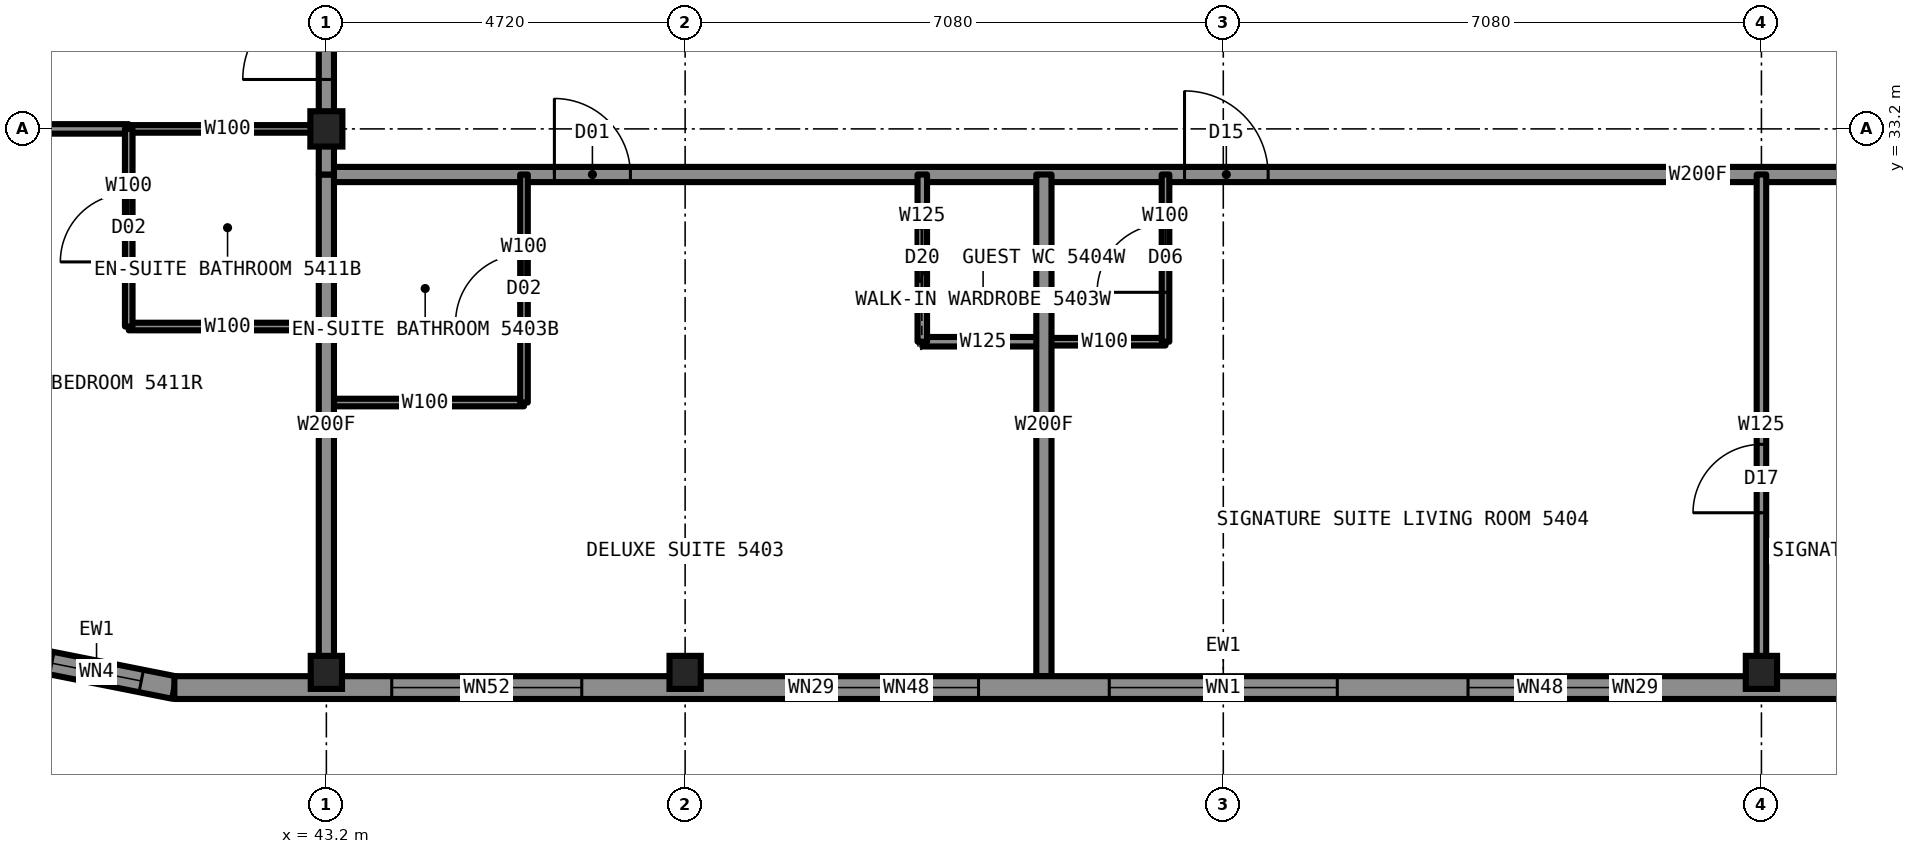
"""IFC4 building model, lengths in metres.
Left out: names, types, materials, properties, quantities, classifications, styles, units other than length and angle.
Written with IfcOpenShell. Run it as: python <this file> out.ifc"""

import sys

from ifc_helpers import new_model, si_unit, direction, frame, frame_2d, origin, origin_2d, place, context, subcontext, project, spatial, rectangle, i_section, extrude, element, fill, save


model = new_model("IFC4")
c1 = context("Model", 3, precision=1e-05, world=origin(), true_north=direction((0.0, 1.0)))
c2 = subcontext(c1, "Body", "Model", "MODEL_VIEW")
j1 = project(units=[si_unit("LENGTHUNIT", "METRE"), si_unit("PLANEANGLEUNIT", "RADIAN")], contexts=[c1])
p1 = place(None, origin())
s1 = spatial("IfcSite", under=j1, at=p1, CompositionType="ELEMENT")
p2 = place(p1, origin())
s2 = spatial("IfcBuilding", under=s1, at=p2, CompositionType="ELEMENT")
p3 = place(p2, frame((0.0, 0.0, 193.3)))
s3 = spatial("IfcBuildingStorey", under=s2, at=p3, CompositionType="ELEMENT", Elevation=193.3)
for number, where, z_axis, x_axis in (
    (1, (43.2, 26.05, 0.0), (0.0, 0.0, 1.0), (1.0, 0.0, 0.0)),
    (2, (47.92, 26.05, 0.0), (0.0, 0.0, 1.0), (1.0, 0.0, 0.0)),
    (3, (62.08, 26.05, 0.0), (0.0, 0.0, 1.0), (1.0, 0.0, 0.0)),
):
    element("IfcColumn", number, at=place(p3, frame(where, z_axis=z_axis, x_axis=x_axis)), inside=s3, PredefinedType="COLUMN", context=c2, shape_type="SweptSolid", body=[
        extrude(i_section(OverallWidth=0.411, OverallDepth=0.434, WebThickness=0.036, FlangeThickness=0.057, at=origin_2d()), origin(), (0.0, 0.0, 1.0), 3.5),
    ])
p4 = place(p3, frame((43.2, 33.2, 0.0), z_axis=(0.0, 0.0, 1.0), x_axis=(1.0, 0.0, 0.0)))
e4 = element("IfcColumn", 4, at=p4, inside=s3, PredefinedType="COLUMN", context=c2, shape_type="SweptSolid", body=[
    extrude(i_section(OverallWidth=0.422, OverallDepth=0.465, WebThickness=0.045, FlangeThickness=0.073, at=origin_2d()), origin(), (0.0, 0.0, 1.0), 3.5),
])
p5 = place(p3, frame((40.6, 33.2, 0.0), z_axis=(0.0, 0.0, 1.0), x_axis=(1.0, 0.0, 0.0)))
e5 = element("IfcWall", 5, at=p5, inside=s3, PredefinedType="PARTITIONING", context=c2, shape_type="SweptSolid", body=[
    extrude(rectangle(XDim=2.6, YDim=0.1, at=frame_2d((1.3, 0.0))), origin(), (0.0, 0.0, 1.0), 2.573),
])
p6 = place(p3, frame((36.0, 33.2, 0.0), z_axis=(0.0, 0.0, 1.0), x_axis=(1.0, 0.0, 0.0)))
e6 = element("IfcWall", 6, at=p6, inside=s3, PredefinedType="PARTITIONING", context=c2, shape_type="SweptSolid", body=[
    extrude(rectangle(XDim=4.6, YDim=0.125, at=frame_2d((2.3, 0.0))), origin(), (0.0, 0.0, 1.0), 2.573),
])
p7 = place(p6, frame((2.55, 0.0, 0.0)))
e7 = element("IfcOpeningElement", 7, at=p7, cuts=e6, PredefinedType="OPENING", context=c2, shape_type="SweptSolid", body=[
    extrude(rectangle(XDim=0.9, YDim=2.2, at=frame_2d((0.45, 1.1))), frame((0.0, 0.073, 0.0), z_axis=(0.0, -1.0, 0.0), x_axis=(1.0, 0.0, 0.0)), (0.0, 0.0, 1.0), 0.145),
])
p8 = place(p3, frame((43.2, 32.6, 0.0), z_axis=(0.0, 0.0, 1.0), x_axis=(1.0, 0.0, 0.0)))
e8 = element("IfcWall", 8, at=p8, inside=s3, PredefinedType="PARTITIONING", context=c2, shape_type="SweptSolid", body=[
    extrude(rectangle(XDim=23.6, YDim=0.2, at=frame_2d((11.8, 0.0))), origin(), (0.0, 0.0, 1.0), 3.33),
])
p9 = place(p8, frame((3.0, 0.0, 0.0)))
e9 = element("IfcOpeningElement", 9, at=p9, cuts=e8, PredefinedType="OPENING", context=c2, shape_type="SweptSolid", body=[
    extrude(rectangle(XDim=1.0, YDim=2.2, at=frame_2d((0.5, 1.1))), frame((0.0, 0.11, 0.0), z_axis=(0.0, -1.0, 0.0), x_axis=(1.0, 0.0, 0.0)), (0.0, 0.0, 1.0), 0.22),
])
p10 = place(p8, frame((11.29, 0.0, 0.0)))
e10 = element("IfcOpeningElement", 10, at=p10, cuts=e8, PredefinedType="OPENING", context=c2, shape_type="SweptSolid", body=[
    extrude(rectangle(XDim=1.1, YDim=2.2, at=frame_2d((0.55, 1.1))), frame((0.0, 0.11, 0.0), z_axis=(0.0, -1.0, 0.0), x_axis=(1.0, 0.0, 0.0)), (0.0, 0.0, 1.0), 0.22),
])
p11 = place(p3, frame((40.6, 30.6, 0.0), z_axis=(0.0, 0.0, 1.0), x_axis=(1.0, 0.0, 0.0)))
e11 = element("IfcWall", 11, at=p11, inside=s3, PredefinedType="PARTITIONING", context=c2, shape_type="SweptSolid", body=[
    extrude(rectangle(XDim=2.6, YDim=0.1, at=frame_2d((1.3, 0.0))), origin(), (0.0, 0.0, 1.0), 3.33),
])
p12 = place(p3, frame((52.64, 30.4, 0.0), z_axis=(0.0, 0.0, 1.0), x_axis=(1.0, 0.0, 0.0)))
e12 = element("IfcWall", 12, at=p12, inside=s3, PredefinedType="PARTITIONING", context=c2, shape_type="SweptSolid", body=[
    extrude(rectangle(XDim=1.6, YDim=0.1, at=frame_2d((0.8, 0.0))), origin(), (0.0, 0.0, 1.0), 3.33),
])
p13 = place(p3, frame((51.04, 30.4, 0.0), z_axis=(0.0, 0.0, 1.0), x_axis=(1.0, 0.0, 0.0)))
e13 = element("IfcWall", 13, at=p13, inside=s3, PredefinedType="PARTITIONING", context=c2, shape_type="SweptSolid", body=[
    extrude(rectangle(XDim=1.6, YDim=0.125, at=frame_2d((0.8, 0.0))), origin(), (0.0, 0.0, 1.0), 3.33),
])
p14 = place(p3, frame((43.2, 29.6, 0.0), z_axis=(0.0, 0.0, 1.0), x_axis=(1.0, 0.0, 0.0)))
e14 = element("IfcWall", 14, at=p14, inside=s3, PredefinedType="PARTITIONING", context=c2, shape_type="SweptSolid", body=[
    extrude(rectangle(XDim=2.6, YDim=0.1, at=frame_2d((1.3, 0.0))), origin(), (0.0, 0.0, 1.0), 3.33),
])
p15 = place(p3, frame((54.24, 30.4, 0.0), z_axis=(0.0, 0.0, 1.0), x_axis=(0.0, 1.0, 0.0)))
e15 = element("IfcWall", 15, at=p15, inside=s3, PredefinedType="PARTITIONING", context=c2, shape_type="SweptSolid", body=[
    extrude(rectangle(XDim=2.2, YDim=0.1, at=frame_2d((1.1, 0.0))), origin(), (0.0, 0.0, 1.0), 3.33),
])
p16 = place(p15, frame((0.65, 0.0, 0.0)))
e16 = element("IfcOpeningElement", 16, at=p16, cuts=e15, PredefinedType="OPENING", context=c2, shape_type="SweptSolid", body=[
    extrude(rectangle(XDim=0.9, YDim=2.1, at=frame_2d((0.45, 1.05))), frame((0.0, 0.06, 0.0), z_axis=(0.0, -1.0, 0.0), x_axis=(1.0, 0.0, 0.0)), (0.0, 0.0, 1.0), 0.12),
])
p17 = place(p3, frame((43.2, 33.22, 0.0), z_axis=(0.0, 0.0, 1.0), x_axis=(0.0, 1.0, 0.0)))
e17 = element("IfcWall", 17, at=p17, inside=s3, PredefinedType="PARTITIONING", context=c2, shape_type="SweptSolid", body=[
    extrude(rectangle(XDim=23.56, YDim=0.2, at=frame_2d((11.78, 0.0))), origin(), (0.0, 0.0, 1.0), 3.33),
])
p18 = place(p17, frame((7.25, 0.0, 0.0)))
e18 = element("IfcOpeningElement", 18, at=p18, cuts=e17, PredefinedType="OPENING", context=c2, shape_type="SweptSolid", body=[
    extrude(rectangle(XDim=1.0, YDim=2.2, at=frame_2d((0.5, 1.1))), frame((0.0, 0.11, 0.0), z_axis=(0.0, -1.0, 0.0), x_axis=(1.0, 0.0, 0.0)), (0.0, 0.0, 1.0), 0.22),
])
p19 = place(p17, frame((12.42, 0.0, 0.0)))
e19 = element("IfcOpeningElement", 19, at=p19, cuts=e17, PredefinedType="OPENING", context=c2, shape_type="SweptSolid", body=[
    extrude(rectangle(XDim=1.0, YDim=2.2, at=frame_2d((0.5, 1.1))), frame((0.0, 0.11, 0.0), z_axis=(0.0, -1.0, 0.0), x_axis=(1.0, 0.0, 0.0)), (0.0, 0.0, 1.0), 0.22),
])
p20 = place(p17, frame((22.03, 0.0, 0.0)))
e20 = element("IfcOpeningElement", 20, at=p20, cuts=e17, PredefinedType="OPENING", context=c2, shape_type="SweptSolid", body=[
    extrude(rectangle(XDim=1.1, YDim=2.2, at=frame_2d((0.55, 1.1))), frame((0.0, 0.11, 0.0), z_axis=(0.0, -1.0, 0.0), x_axis=(1.0, 0.0, 0.0)), (0.0, 0.0, 1.0), 0.22),
])
p21 = place(p17, frame((0.63, 0.0, 0.0)))
e21 = element("IfcOpeningElement", 21, at=p21, cuts=e17, PredefinedType="OPENING", context=c2, shape_type="SweptSolid", body=[
    extrude(rectangle(XDim=1.1, YDim=2.2, at=frame_2d((0.55, 1.1))), frame((0.0, 0.11, 0.0), z_axis=(0.0, -1.0, 0.0), x_axis=(1.0, 0.0, 0.0)), (0.0, 0.0, 1.0), 0.22),
])
p22 = place(p3, frame((43.2, 26.0, 0.0), z_axis=(0.0, 0.0, 1.0), x_axis=(0.0, 1.0, 0.0)))
e22 = element("IfcWall", 22, at=p22, inside=s3, PredefinedType="PARTITIONING", context=c2, shape_type="SweptSolid", body=[
    extrude(rectangle(XDim=6.6, YDim=0.2, at=frame_2d((3.3, 0.0))), origin(), (0.0, 0.0, 1.0), 2.573),
])
p23 = place(p3, frame((40.6, 30.6, 0.0), z_axis=(0.0, 0.0, 1.0), x_axis=(0.0, 1.0, 0.0)))
e23 = element("IfcWall", 23, at=p23, inside=s3, PredefinedType="PARTITIONING", context=c2, shape_type="SweptSolid", body=[
    extrude(rectangle(XDim=2.6, YDim=0.1, at=frame_2d((1.3, 0.0))), origin(), (0.0, 0.0, 1.0), 3.33),
])
p24 = place(p23, frame((0.85, 0.0, 0.0)))
e24 = element("IfcOpeningElement", 24, at=p24, cuts=e23, PredefinedType="OPENING", context=c2, shape_type="SweptSolid", body=[
    extrude(rectangle(XDim=0.9, YDim=2.1, at=frame_2d((0.45, 1.05))), frame((0.0, 0.06, 0.0), z_axis=(0.0, -1.0, 0.0), x_axis=(1.0, 0.0, 0.0)), (0.0, 0.0, 1.0), 0.12),
])
p25 = place(p3, frame((52.64, 26.0, 0.0), z_axis=(0.0, 0.0, 1.0), x_axis=(0.0, 1.0, 0.0)))
e25 = element("IfcWall", 25, at=p25, inside=s3, PredefinedType="PARTITIONING", context=c2, shape_type="SweptSolid", body=[
    extrude(rectangle(XDim=6.6, YDim=0.2, at=frame_2d((3.3, 0.0))), origin(), (0.0, 0.0, 1.0), 3.33),
])
p26 = place(p3, frame((51.04, 30.4, 0.0), z_axis=(0.0, 0.0, 1.0), x_axis=(0.0, 1.0, 0.0)))
e26 = element("IfcWall", 26, at=p26, inside=s3, PredefinedType="PARTITIONING", context=c2, shape_type="SweptSolid", body=[
    extrude(rectangle(XDim=2.2, YDim=0.125, at=frame_2d((1.1, 0.0))), origin(), (0.0, 0.0, 1.0), 3.33),
])
p27 = place(p26, frame((0.7, 0.0, 0.0)))
e27 = element("IfcOpeningElement", 27, at=p27, cuts=e26, PredefinedType="OPENING", context=c2, shape_type="SweptSolid", body=[
    extrude(rectangle(XDim=0.8, YDim=2.1, at=frame_2d((0.4, 1.05))), frame((0.0, 0.073, 0.0), z_axis=(0.0, -1.0, 0.0), x_axis=(1.0, 0.0, 0.0)), (0.0, 0.0, 1.0), 0.145),
])
p28 = place(p3, frame((45.8, 29.6, 0.0), z_axis=(0.0, 0.0, 1.0), x_axis=(0.0, 1.0, 0.0)))
e28 = element("IfcWall", 28, at=p28, inside=s3, PredefinedType="PARTITIONING", context=c2, shape_type="SweptSolid", body=[
    extrude(rectangle(XDim=3.0, YDim=0.1, at=frame_2d((1.5, 0.0))), origin(), (0.0, 0.0, 1.0), 3.33),
])
p29 = place(p28, frame((1.05, 0.0, 0.0)))
e29 = element("IfcOpeningElement", 29, at=p29, cuts=e28, PredefinedType="OPENING", context=c2, shape_type="SweptSolid", body=[
    extrude(rectangle(XDim=0.9, YDim=2.1, at=frame_2d((0.45, 1.05))), frame((0.0, 0.06, 0.0), z_axis=(0.0, -1.0, 0.0), x_axis=(1.0, 0.0, 0.0)), (0.0, 0.0, 1.0), 0.12),
])
p30 = place(p3, frame((62.08, 26.0, 0.0), z_axis=(0.0, 0.0, 1.0), x_axis=(0.0, 1.0, 0.0)))
e30 = element("IfcWall", 30, at=p30, inside=s3, PredefinedType="PARTITIONING", context=c2, shape_type="SweptSolid", body=[
    extrude(rectangle(XDim=6.6, YDim=0.125, at=frame_2d((3.3, 0.0))), origin(), (0.0, 0.0, 1.0), 2.573),
])
p31 = place(p30, frame((2.15, 0.0, 0.0)))
e31 = element("IfcOpeningElement", 31, at=p31, cuts=e30, PredefinedType="OPENING", context=c2, shape_type="SweptSolid", body=[
    extrude(rectangle(XDim=0.9, YDim=2.2, at=frame_2d((0.45, 1.1))), frame((0.0, 0.073, 0.0), z_axis=(0.0, -1.0, 0.0), x_axis=(1.0, 0.0, 0.0)), (0.0, 0.0, 1.0), 0.145),
])
p32 = place(p3, frame((39.153, 26.257, 0.0), z_axis=(0.0, 0.0, 1.0), x_axis=(0.980787050784, -0.195081421501, 0.0)))
e32 = element("IfcWall", 32, at=p32, inside=s3, PredefinedType="SOLIDWALL", context=c2, shape_type="SweptSolid", body=[
    extrude(rectangle(XDim=2.087, YDim=0.3, at=frame_2d((1.044, 0.0))), origin(), (0.0, 0.0, 1.0), 3.33),
])
p33 = place(p32, frame((0.444, 0.0, 0.3)))
e33 = element("IfcOpeningElement", 33, at=p33, cuts=e32, PredefinedType="OPENING", context=c2, shape_type="SweptSolid", body=[
    extrude(rectangle(XDim=1.2, YDim=2.0, at=frame_2d((0.6, 1.0))), frame((0.0, 0.16, 0.0), z_axis=(0.0, -1.0, 0.0), x_axis=(1.0, 0.0, 0.0)), (0.0, 0.0, 1.0), 0.32),
])
p34 = place(p3, frame((41.2, 25.85, 0.0), z_axis=(0.0, 0.0, 1.0), x_axis=(1.0, 0.0, 0.0)))
e34 = element("IfcWall", 34, at=p34, inside=s3, PredefinedType="SOLIDWALL", context=c2, shape_type="SweptSolid", body=[
    extrude(rectangle(XDim=27.6, YDim=0.3, at=frame_2d((13.8, 0.0))), origin(), (0.0, 0.0, 1.0), 2.83),
])
p35 = place(p34, frame((2.86, 0.0, 0.3)))
e35 = element("IfcOpeningElement", 35, at=p35, cuts=e34, PredefinedType="OPENING", context=c2, shape_type="SweptSolid", body=[
    extrude(rectangle(XDim=3.0, YDim=2.0, at=frame_2d((1.5, 1.0))), frame((0.0, 0.16, 0.0), z_axis=(0.0, -1.0, 0.0), x_axis=(1.0, 0.0, 0.0)), (0.0, 0.0, 1.0), 0.32),
])
p36 = place(p34, frame((7.58, 0.0, 0.3)))
e36 = element("IfcOpeningElement", 36, at=p36, cuts=e34, PredefinedType="OPENING", context=c2, shape_type="SweptSolid", body=[
    extrude(rectangle(XDim=2.5, YDim=2.0, at=frame_2d((1.25, 1.0))), frame((0.0, 0.16, 0.0), z_axis=(0.0, -1.0, 0.0), x_axis=(1.0, 0.0, 0.0)), (0.0, 0.0, 1.0), 0.32),
])
p37 = place(p34, frame((12.95, 0.0, 1.0)))
e37 = element("IfcOpeningElement", 37, at=p37, cuts=e34, PredefinedType="OPENING", context=c2, shape_type="SweptSolid", body=[
    extrude(rectangle(XDim=1.7, YDim=1.3, at=frame_2d((0.85, 0.65))), frame((0.0, 0.16, 0.0), z_axis=(0.0, -1.0, 0.0), x_axis=(1.0, 0.0, 0.0)), (0.0, 0.0, 1.0), 0.32),
])
p38 = place(p34, frame((17.52, 0.0, 0.3)))
e38 = element("IfcOpeningElement", 38, at=p38, cuts=e34, PredefinedType="OPENING", context=c2, shape_type="SweptSolid", body=[
    extrude(rectangle(XDim=2.5, YDim=2.0, at=frame_2d((1.25, 1.0))), frame((0.0, 0.16, 0.0), z_axis=(0.0, -1.0, 0.0), x_axis=(1.0, 0.0, 0.0)), (0.0, 0.0, 1.0), 0.32),
])
p39 = place(p34, frame((21.74, 0.0, 0.3)))
e39 = element("IfcOpeningElement", 39, at=p39, cuts=e34, PredefinedType="OPENING", context=c2, shape_type="SweptSolid", body=[
    extrude(rectangle(XDim=3.0, YDim=2.0, at=frame_2d((1.5, 1.0))), frame((0.0, 0.16, 0.0), z_axis=(0.0, -1.0, 0.0), x_axis=(1.0, 0.0, 0.0)), (0.0, 0.0, 1.0), 0.32),
])
p40 = place(p3, frame((43.2, 32.6, 0.0), z_axis=(0.0, 0.0, 1.0), x_axis=(0.0, 1.0, 0.0)))
e40 = element("IfcWall", 40, at=p40, inside=s3, PredefinedType="PARTITIONING", context=c2, shape_type="SweptSolid", body=[
    extrude(rectangle(XDim=0.62, YDim=0.2, at=frame_2d((0.31, 0.0))), origin(), (0.0, 0.0, 1.0), 2.573),
])
p41 = place(p9, origin())
e41 = element("IfcDoor", 41, at=p41, inside=s3, OperationType="SINGLE_SWING_LEFT", PredefinedType="DOOR", context=c2, shape_type="SweptSolid", body=[
    extrude(rectangle(XDim=1.0, YDim=2.2, at=frame_2d((0.5, 1.1))), frame((0.0, 0.025, 0.0), z_axis=(0.0, -1.0, 0.0), x_axis=(1.0, 0.0, 0.0)), (0.0, 0.0, 1.0), 0.05),
])
fill(e9, e41)
p42 = place(p29, origin())
e42 = element("IfcDoor", 42, at=p42, inside=s3, OperationType="SINGLE_SWING_RIGHT", PredefinedType="DOOR", context=c2, shape_type="SweptSolid", body=[
    extrude(rectangle(XDim=0.9, YDim=2.1, at=frame_2d((0.45, 1.05))), frame((0.0, 0.025, 0.0), z_axis=(0.0, -1.0, 0.0), x_axis=(1.0, 0.0, 0.0)), (0.0, 0.0, 1.0), 0.05),
])
fill(e29, e42)
p43 = place(p27, origin())
e43 = element("IfcDoor", 43, at=p43, inside=s3, OperationType="SLIDING_TO_LEFT", PredefinedType="DOOR", context=c2, shape_type="SweptSolid", body=[
    extrude(rectangle(XDim=0.8, YDim=2.1, at=frame_2d((0.4, 1.05))), frame((0.0, 0.025, 0.0), z_axis=(0.0, -1.0, 0.0), x_axis=(1.0, 0.0, 0.0)), (0.0, 0.0, 1.0), 0.05),
])
fill(e27, e43)
p44 = place(p10, origin())
e44 = element("IfcDoor", 44, at=p44, inside=s3, OperationType="SINGLE_SWING_LEFT", PredefinedType="DOOR", context=c2, shape_type="SweptSolid", body=[
    extrude(rectangle(XDim=1.1, YDim=2.2, at=frame_2d((0.55, 1.1))), frame((0.0, 0.025, 0.0), z_axis=(0.0, -1.0, 0.0), x_axis=(1.0, 0.0, 0.0)), (0.0, 0.0, 1.0), 0.05),
])
fill(e10, e44)
p45 = place(p31, origin())
e45 = element("IfcDoor", 45, at=p45, inside=s3, OperationType="SINGLE_SWING_LEFT", PredefinedType="DOOR", context=c2, shape_type="SweptSolid", body=[
    extrude(rectangle(XDim=0.9, YDim=2.2, at=frame_2d((0.45, 1.1))), frame((0.0, 0.025, 0.0), z_axis=(0.0, -1.0, 0.0), x_axis=(1.0, 0.0, 0.0)), (0.0, 0.0, 1.0), 0.05),
])
fill(e31, e45)
p46 = place(p16, origin())
e46 = element("IfcDoor", 46, at=p46, inside=s3, OperationType="SINGLE_SWING_LEFT", PredefinedType="DOOR", context=c2, shape_type="SweptSolid", body=[
    extrude(rectangle(XDim=0.9, YDim=2.1, at=frame_2d((0.45, 1.05))), frame((0.0, 0.025, 0.0), z_axis=(0.0, -1.0, 0.0), x_axis=(1.0, 0.0, 0.0)), (0.0, 0.0, 1.0), 0.05),
])
fill(e16, e46)
p47 = place(p21, origin())
e47 = element("IfcDoor", 47, at=p47, inside=s3, OperationType="SINGLE_SWING_LEFT", PredefinedType="DOOR", context=c2, shape_type="SweptSolid", body=[
    extrude(rectangle(XDim=1.1, YDim=2.2, at=frame_2d((0.55, 1.1))), frame((0.0, 0.025, 0.0), z_axis=(0.0, -1.0, 0.0), x_axis=(1.0, 0.0, 0.0)), (0.0, 0.0, 1.0), 0.05),
])
fill(e21, e47)
p48 = place(p24, origin())
e48 = element("IfcDoor", 48, at=p48, inside=s3, OperationType="SINGLE_SWING_RIGHT", PredefinedType="DOOR", context=c2, shape_type="SweptSolid", body=[
    extrude(rectangle(XDim=0.9, YDim=2.1, at=frame_2d((0.45, 1.05))), frame((0.0, 0.025, 0.0), z_axis=(0.0, -1.0, 0.0), x_axis=(1.0, 0.0, 0.0)), (0.0, 0.0, 1.0), 0.05),
])
fill(e24, e48)
p49 = place(p33, origin())
e49 = element("IfcWindow", 49, at=p49, inside=s3, PartitioningType="SINGLE_PANEL", PredefinedType="WINDOW", context=c2, shape_type="SweptSolid", body=[
    extrude(rectangle(XDim=1.2, YDim=2.0, at=frame_2d((0.6, 1.0))), frame((0.0, 0.13, 0.0), z_axis=(0.0, -1.0, 0.0), x_axis=(1.0, 0.0, 0.0)), (0.0, 0.0, 1.0), 0.06),
])
fill(e33, e49)
p50 = place(p35, origin())
e50 = element("IfcWindow", 50, at=p50, inside=s3, PartitioningType="SINGLE_PANEL", PredefinedType="WINDOW", context=c2, shape_type="SweptSolid", body=[
    extrude(rectangle(XDim=3.0, YDim=2.0, at=frame_2d((1.5, 1.0))), frame((0.0, 0.13, 0.0), z_axis=(0.0, -1.0, 0.0), x_axis=(1.0, 0.0, 0.0)), (0.0, 0.0, 1.0), 0.06),
])
fill(e35, e50)
p51 = place(p36, origin())
e51 = element("IfcWindow", 51, at=p51, inside=s3, PartitioningType="SINGLE_PANEL", PredefinedType="WINDOW", context=c2, shape_type="SweptSolid", body=[
    extrude(rectangle(XDim=2.5, YDim=2.0, at=frame_2d((1.25, 1.0))), frame((0.0, 0.13, 0.0), z_axis=(0.0, -1.0, 0.0), x_axis=(1.0, 0.0, 0.0)), (0.0, 0.0, 1.0), 0.06),
])
fill(e36, e51)
p52 = place(p37, origin())
e52 = element("IfcWindow", 52, at=p52, inside=s3, PartitioningType="SINGLE_PANEL", PredefinedType="WINDOW", context=c2, shape_type="SweptSolid", body=[
    extrude(rectangle(XDim=1.7, YDim=1.3, at=frame_2d((0.85, 0.65))), frame((0.0, 0.13, 0.0), z_axis=(0.0, -1.0, 0.0), x_axis=(1.0, 0.0, 0.0)), (0.0, 0.0, 1.0), 0.06),
])
fill(e37, e52)
p53 = place(p38, origin())
e53 = element("IfcWindow", 53, at=p53, inside=s3, PartitioningType="SINGLE_PANEL", PredefinedType="WINDOW", context=c2, shape_type="SweptSolid", body=[
    extrude(rectangle(XDim=2.5, YDim=2.0, at=frame_2d((1.25, 1.0))), frame((0.0, 0.13, 0.0), z_axis=(0.0, -1.0, 0.0), x_axis=(1.0, 0.0, 0.0)), (0.0, 0.0, 1.0), 0.06),
])
fill(e38, e53)
p54 = place(p39, origin())
e54 = element("IfcWindow", 54, at=p54, inside=s3, PartitioningType="SINGLE_PANEL", PredefinedType="WINDOW", context=c2, shape_type="SweptSolid", body=[
    extrude(rectangle(XDim=3.0, YDim=2.0, at=frame_2d((1.5, 1.0))), frame((0.0, 0.13, 0.0), z_axis=(0.0, -1.0, 0.0), x_axis=(1.0, 0.0, 0.0)), (0.0, 0.0, 1.0), 0.06),
])
fill(e39, e54)
save(model, sys.argv[1])
